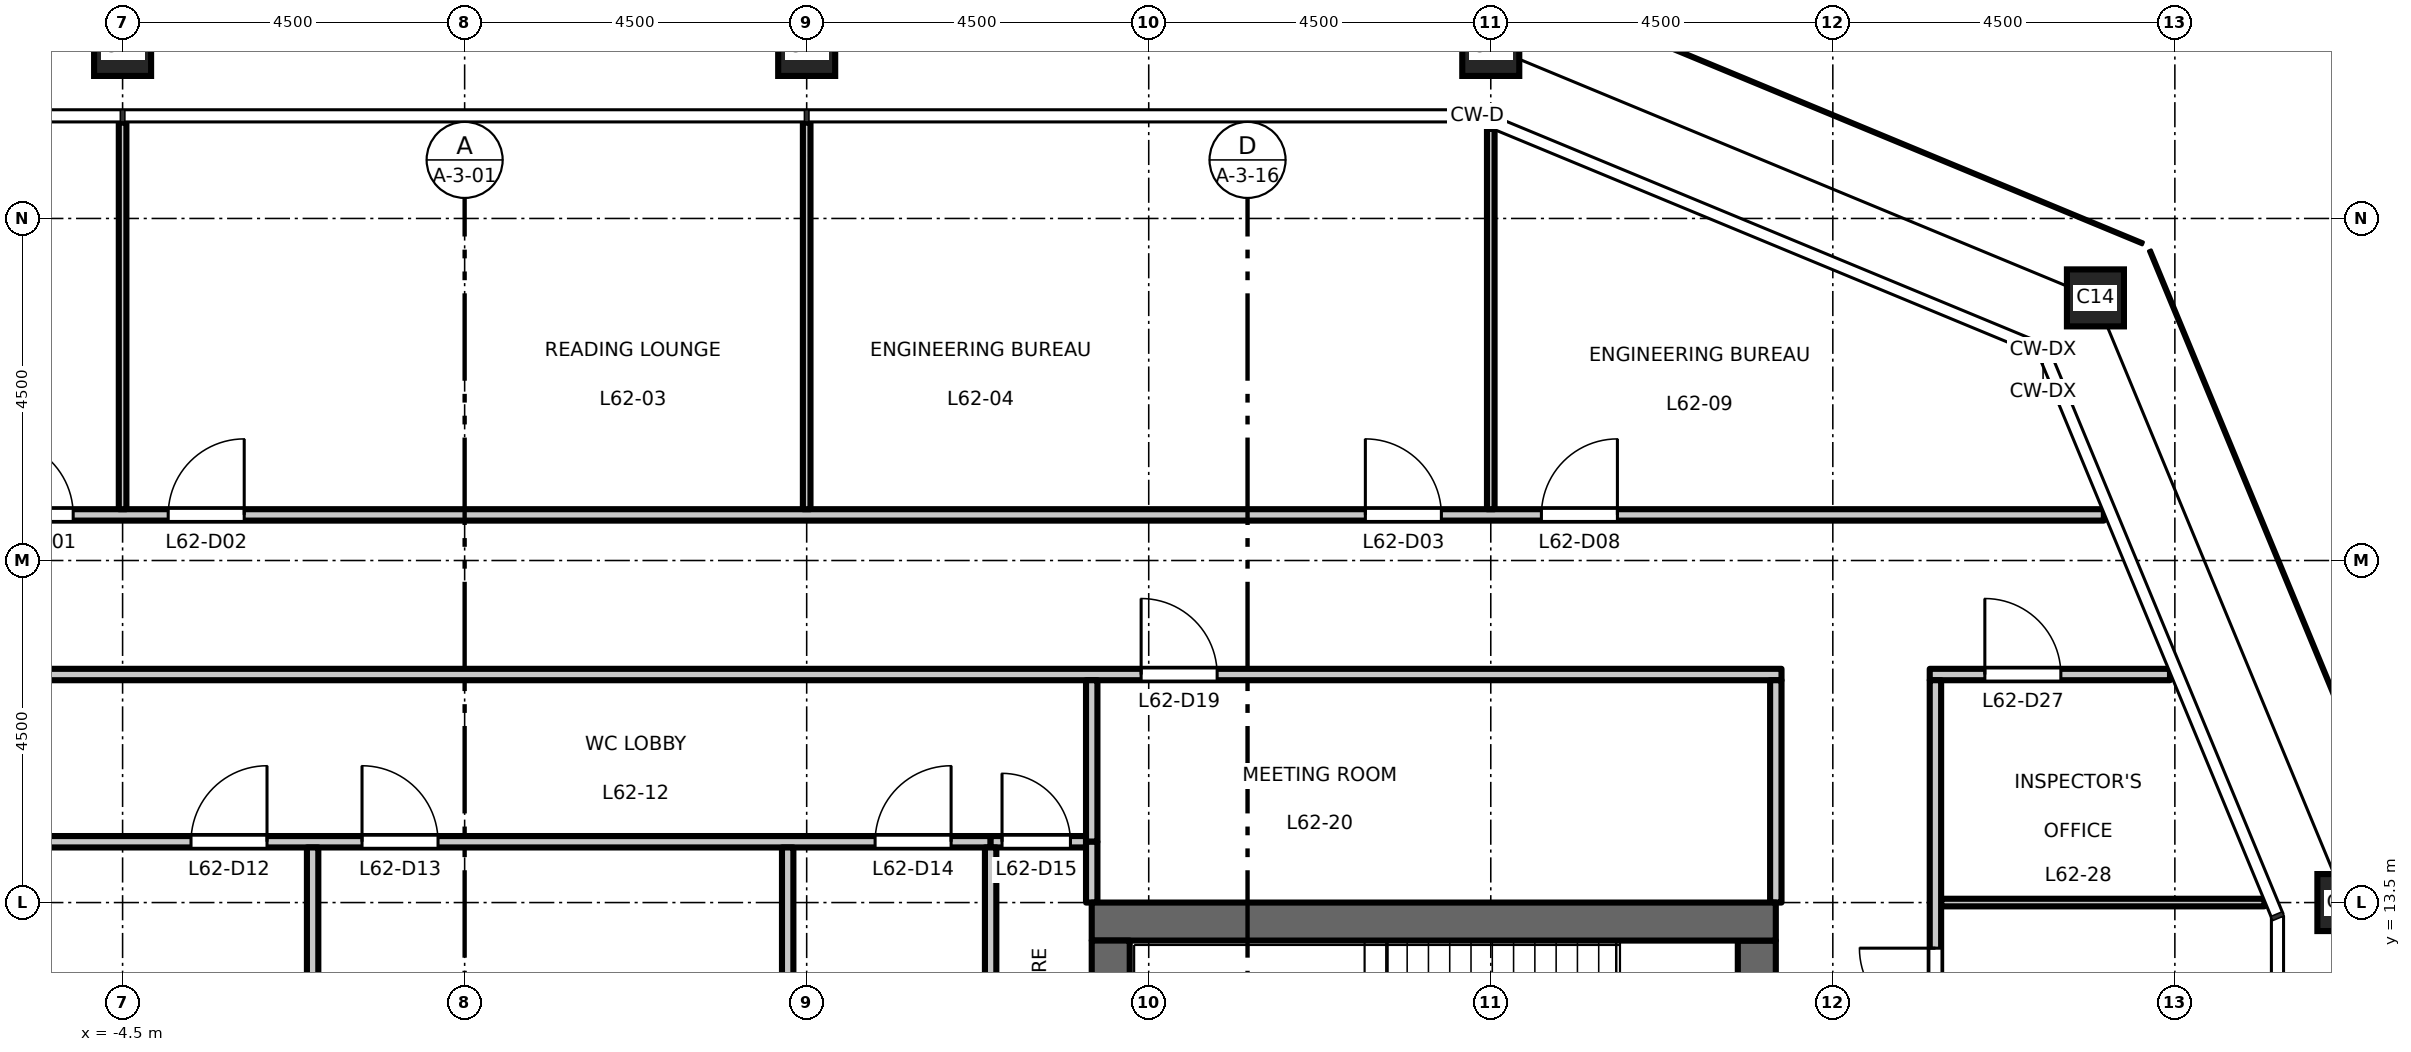
"""IFC4 building model, lengths in metres.
Left out: names, types, materials, properties, quantities, classifications, styles, units other than length and angle.
Written with IfcOpenShell. Run it as: python <this file> out.ifc"""

import sys

from ifc_helpers import new_model, si_unit, direction, frame, frame_2d, origin, origin_2d, place, context, subcontext, project, spatial, rectangle, hollow_rectangle, extrude, element, fill, save


model = new_model("IFC4")
c1 = context("Model", 3, precision=1e-05, world=origin(), true_north=direction((0.0, 1.0)))
c2 = subcontext(c1, "Body", "Model", "MODEL_VIEW")
j1 = project(units=[si_unit("LENGTHUNIT", "METRE"), si_unit("PLANEANGLEUNIT", "RADIAN")], contexts=[c1])
p1 = place(None, origin())
s1 = spatial("IfcSite", under=j1, at=p1, CompositionType="ELEMENT")
p2 = place(p1, origin())
s2 = spatial("IfcBuilding", under=s1, at=p2, CompositionType="ELEMENT")
p3 = place(p2, frame((0.0, 0.0, 289.7)))
s3 = spatial("IfcBuildingStorey", under=s2, at=p3, CompositionType="ELEMENT", Elevation=289.7)
for number, where, z_axis, x_axis in (
    (1, (24.75, 13.5, 0.0), (0.0, 0.0, 1.0), (1.0, 0.0, 0.0)),
    (2, (21.455, 21.455, 0.0), (0.0, 0.0, 1.0), (1.0, 0.0, 0.0)),
    (3, (13.5, 24.75, 0.0), (0.0, 0.0, 1.0), (1.0, 0.0, 0.0)),
    (4, (4.5, 24.75, 0.0), (0.0, 0.0, 1.0), (1.0, 0.0, 0.0)),
    (5, (-4.5, 24.75, 0.0), (0.0, 0.0, 1.0), (1.0, 0.0, 0.0)),
):
    element("IfcColumn", number, at=place(p3, frame(where, z_axis=z_axis, x_axis=x_axis)), inside=s3, PredefinedType="COLUMN", context=c2, shape_type="SweptSolid", body=[
        extrude(hollow_rectangle(XDim=0.75, YDim=0.75, WallThickness=0.04, at=origin_2d()), origin(), (0.0, 0.0, 1.0), 4.5),
    ])
p4 = place(p3, frame((17.0, -13.0, 0.0), z_axis=(0.0, 0.0, 1.0), x_axis=(0.0, 1.0, 0.0)))
e6 = element("IfcWall", 6, at=p4, inside=s3, PredefinedType="SHEAR", context=c2, shape_type="SweptSolid", body=[
    extrude(rectangle(XDim=26.0, YDim=0.5, at=frame_2d((13.0, 0.0))), origin(), (0.0, 0.0, 1.0), 4.35),
])
p5 = place(p4, frame((16.825, 0.0, 0.0)))
e7 = element("IfcOpeningElement", 7, at=p5, cuts=e6, PredefinedType="OPENING", context=c2, shape_type="SweptSolid", body=[
    extrude(rectangle(XDim=1.8, YDim=2.1, at=frame_2d((0.9, 1.05))), frame((0.0, 0.26, 0.0), z_axis=(0.0, -1.0, 0.0), x_axis=(1.0, 0.0, 0.0)), (0.0, 0.0, 1.0), 0.52),
])
p6 = place(p4, frame((7.375, 0.0, 0.0)))
e8 = element("IfcOpeningElement", 8, at=p6, cuts=e6, PredefinedType="OPENING", context=c2, shape_type="SweptSolid", body=[
    extrude(rectangle(XDim=1.8, YDim=2.1, at=frame_2d((0.9, 1.05))), frame((0.0, 0.26, 0.0), z_axis=(0.0, -1.0, 0.0), x_axis=(1.0, 0.0, 0.0)), (0.0, 0.0, 1.0), 0.52),
])
p7 = place(p3, frame((8.25, 13.25, 0.0), z_axis=(0.0, 0.0, 1.0), x_axis=(1.0, 0.0, 0.0)))
e9 = element("IfcWall", 9, at=p7, inside=s3, PredefinedType="SHEAR", context=c2, shape_type="SweptSolid", body=[
    extrude(rectangle(XDim=9.0, YDim=0.5, at=frame_2d((4.5, 0.0))), origin(), (0.0, 0.0, 1.0), 4.35),
])
p8 = place(p3, frame((8.5, -13.0, 0.0), z_axis=(0.0, 0.0, 1.0), x_axis=(0.0, 1.0, 0.0)))
e10 = element("IfcWall", 10, at=p8, inside=s3, PredefinedType="SHEAR", context=c2, shape_type="SweptSolid", body=[
    extrude(rectangle(XDim=26.0, YDim=0.5, at=frame_2d((13.0, 0.0))), origin(), (0.0, 0.0, 1.0), 4.35),
])
p9 = place(p3, frame((19.425, 13.5, 0.0), z_axis=(0.0, 0.0, 1.0), x_axis=(1.0, 0.0, 0.0)))
e11 = element("IfcWall", 11, at=p9, inside=s3, PredefinedType="PARTITIONING", context=c2, shape_type="SweptSolid", body=[
    extrude(rectangle(XDim=4.253, YDim=0.1, at=frame_2d((2.126, 0.0))), origin(), (0.0, 0.0, 1.0), 4.35),
])
p10 = place(p3, frame((-8.175, 14.3, 0.0), z_axis=(0.0, 0.0, 1.0), x_axis=(1.0, 0.0, 0.0)))
e12 = element("IfcWall", 12, at=p10, inside=s3, PredefinedType="PARTITIONING", context=c2, shape_type="SweptSolid", body=[
    extrude(rectangle(XDim=15.095, YDim=0.15, at=frame_2d((7.547, 0.0))), origin(), (0.0, 0.0, 1.0), 4.35),
])
p11 = place(p10, frame((4.575, 0.0, 0.0)))
e13 = element("IfcOpeningElement", 13, at=p11, cuts=e12, PredefinedType="OPENING", context=c2, shape_type="SweptSolid", body=[
    extrude(rectangle(XDim=1.0, YDim=2.1, at=frame_2d((0.5, 1.05))), frame((0.0, 0.085, 0.0), z_axis=(0.0, -1.0, 0.0), x_axis=(1.0, 0.0, 0.0)), (0.0, 0.0, 1.0), 0.17),
])
p12 = place(p10, frame((6.825, 0.0, 0.0)))
e14 = element("IfcOpeningElement", 14, at=p12, cuts=e12, PredefinedType="OPENING", context=c2, shape_type="SweptSolid", body=[
    extrude(rectangle(XDim=1.0, YDim=2.1, at=frame_2d((0.5, 1.05))), frame((0.0, 0.085, 0.0), z_axis=(0.0, -1.0, 0.0), x_axis=(1.0, 0.0, 0.0)), (0.0, 0.0, 1.0), 0.17),
])
p13 = place(p10, frame((13.575, 0.0, 0.0)))
e15 = element("IfcOpeningElement", 15, at=p13, cuts=e12, PredefinedType="OPENING", context=c2, shape_type="SweptSolid", body=[
    extrude(rectangle(XDim=1.0, YDim=2.1, at=frame_2d((0.5, 1.05))), frame((0.0, 0.085, 0.0), z_axis=(0.0, -1.0, 0.0), x_axis=(1.0, 0.0, 0.0)), (0.0, 0.0, 1.0), 0.17),
])
p14 = place(p3, frame((6.92, 14.3, 0.0), z_axis=(0.0, 0.0, 1.0), x_axis=(1.0, 0.0, 0.0)))
e16 = element("IfcWall", 16, at=p14, inside=s3, PredefinedType="PARTITIONING", context=c2, shape_type="SweptSolid", body=[
    extrude(rectangle(XDim=1.255, YDim=0.15, at=frame_2d((0.627, 0.0))), origin(), (0.0, 0.0, 1.0), 4.35),
])
p15 = place(p14, frame((0.15, 0.0, 0.0)))
e17 = element("IfcOpeningElement", 17, at=p15, cuts=e16, PredefinedType="OPENING", context=c2, shape_type="SweptSolid", body=[
    extrude(rectangle(XDim=0.9, YDim=2.1, at=frame_2d((0.45, 1.05))), frame((0.0, 0.085, 0.0), z_axis=(0.0, -1.0, 0.0), x_axis=(1.0, 0.0, 0.0)), (0.0, 0.0, 1.0), 0.17),
])
p16 = place(p3, frame((-17.325, 16.5, 0.0), z_axis=(0.0, 0.0, 1.0), x_axis=(1.0, 0.0, 0.0)))
e18 = element("IfcWall", 18, at=p16, inside=s3, PredefinedType="PARTITIONING", context=c2, shape_type="SweptSolid", body=[
    extrude(rectangle(XDim=34.65, YDim=0.15, at=frame_2d((17.325, 0.0))), origin(), (0.0, 0.0, 1.0), 4.35),
])
p17 = place(p16, frame((9.725, 0.0, 0.0)))
e19 = element("IfcOpeningElement", 19, at=p17, cuts=e18, PredefinedType="OPENING", context=c2, shape_type="SweptSolid", body=[
    extrude(rectangle(XDim=1.0, YDim=2.1, at=frame_2d((0.5, 1.05))), frame((0.0, 0.085, 0.0), z_axis=(0.0, -1.0, 0.0), x_axis=(1.0, 0.0, 0.0)), (0.0, 0.0, 1.0), 0.17),
])
p18 = place(p16, frame((7.475, 0.0, 0.0)))
e20 = element("IfcOpeningElement", 20, at=p18, cuts=e18, PredefinedType="OPENING", context=c2, shape_type="SweptSolid", body=[
    extrude(rectangle(XDim=1.0, YDim=2.1, at=frame_2d((0.5, 1.05))), frame((0.0, 0.085, 0.0), z_axis=(0.0, -1.0, 0.0), x_axis=(1.0, 0.0, 0.0)), (0.0, 0.0, 1.0), 0.17),
])
p19 = place(p16, frame((26.225, 0.0, 0.0)))
e21 = element("IfcOpeningElement", 21, at=p19, cuts=e18, PredefinedType="OPENING", context=c2, shape_type="SweptSolid", body=[
    extrude(rectangle(XDim=1.0, YDim=2.1, at=frame_2d((0.5, 1.05))), frame((0.0, 0.085, 0.0), z_axis=(0.0, -1.0, 0.0), x_axis=(1.0, 0.0, 0.0)), (0.0, 0.0, 1.0), 0.17),
])
p20 = place(p3, frame((19.275, 16.5, 0.0), z_axis=(0.0, 0.0, 1.0), x_axis=(1.0, 0.0, 0.0)))
e22 = element("IfcWall", 22, at=p20, inside=s3, PredefinedType="PARTITIONING", context=c2, shape_type="SweptSolid", body=[
    extrude(rectangle(XDim=3.161, YDim=0.15, at=frame_2d((1.581, 0.0))), origin(), (0.0, 0.0, 1.0), 4.35),
])
p21 = place(p20, frame((0.725, 0.0, 0.0)))
e23 = element("IfcOpeningElement", 23, at=p21, cuts=e22, PredefinedType="OPENING", context=c2, shape_type="SweptSolid", body=[
    extrude(rectangle(XDim=1.0, YDim=2.1, at=frame_2d((0.5, 1.05))), frame((0.0, 0.085, 0.0), z_axis=(0.0, -1.0, 0.0), x_axis=(1.0, 0.0, 0.0)), (0.0, 0.0, 1.0), 0.17),
])
p22 = place(p3, frame((-21.566, 18.6, 0.0), z_axis=(0.0, 0.0, 1.0), x_axis=(1.0, 0.0, 0.0)))
e24 = element("IfcWall", 24, at=p22, inside=s3, PredefinedType="PARTITIONING", context=c2, shape_type="SweptSolid", body=[
    extrude(rectangle(XDim=43.132, YDim=0.15, at=frame_2d((21.566, 0.0))), origin(), (0.0, 0.0, 1.0), 4.35),
])
p23 = place(p22, frame((15.416, 0.0, 0.0)))
e25 = element("IfcOpeningElement", 25, at=p23, cuts=e24, PredefinedType="OPENING", context=c2, shape_type="SweptSolid", body=[
    extrude(rectangle(XDim=1.0, YDim=2.1, at=frame_2d((0.5, 1.05))), frame((0.0, 0.085, 0.0), z_axis=(0.0, -1.0, 0.0), x_axis=(1.0, 0.0, 0.0)), (0.0, 0.0, 1.0), 0.17),
])
p24 = place(p22, frame((17.666, 0.0, 0.0)))
e26 = element("IfcOpeningElement", 26, at=p24, cuts=e24, PredefinedType="OPENING", context=c2, shape_type="SweptSolid", body=[
    extrude(rectangle(XDim=1.0, YDim=2.1, at=frame_2d((0.5, 1.05))), frame((0.0, 0.085, 0.0), z_axis=(0.0, -1.0, 0.0), x_axis=(1.0, 0.0, 0.0)), (0.0, 0.0, 1.0), 0.17),
])
p25 = place(p22, frame((33.416, 0.0, 0.0)))
e27 = element("IfcOpeningElement", 27, at=p25, cuts=e24, PredefinedType="OPENING", context=c2, shape_type="SweptSolid", body=[
    extrude(rectangle(XDim=1.0, YDim=2.1, at=frame_2d((0.5, 1.05))), frame((0.0, 0.085, 0.0), z_axis=(0.0, -1.0, 0.0), x_axis=(1.0, 0.0, 0.0)), (0.0, 0.0, 1.0), 0.17),
])
p26 = place(p22, frame((6.416, 0.0, 0.0)))
e28 = element("IfcOpeningElement", 28, at=p26, cuts=e24, PredefinedType="OPENING", context=c2, shape_type="SweptSolid", body=[
    extrude(rectangle(XDim=1.0, YDim=2.1, at=frame_2d((0.5, 1.05))), frame((0.0, 0.085, 0.0), z_axis=(0.0, -1.0, 0.0), x_axis=(1.0, 0.0, 0.0)), (0.0, 0.0, 1.0), 0.17),
])
p27 = place(p22, frame((35.732, 0.0, 0.0)))
e29 = element("IfcOpeningElement", 29, at=p27, cuts=e24, PredefinedType="OPENING", context=c2, shape_type="SweptSolid", body=[
    extrude(rectangle(XDim=1.0, YDim=2.1, at=frame_2d((0.5, 1.05))), frame((0.0, 0.085, 0.0), z_axis=(0.0, -1.0, 0.0), x_axis=(1.0, 0.0, 0.0)), (0.0, 0.0, 1.0), 0.17),
])
p28 = place(p3, frame((-4.5, 18.675, 0.0), z_axis=(0.0, 0.0, 1.0), x_axis=(0.0, 1.0, 0.0)))
e30 = element("IfcWall", 30, at=p28, inside=s3, PredefinedType="PARTITIONING", context=c2, shape_type="SweptSolid", body=[
    extrude(rectangle(XDim=5.085, YDim=0.1, at=frame_2d((2.542, 0.0))), origin(), (0.0, 0.0, 1.0), 3.65),
])
for number, where, z_axis, x_axis in (
    (31, (-2.0, 8.37, 0.0), (0.0, 0.0, 1.0), (0.0, 1.0, 0.0)),
    (32, (4.25, 8.37, 0.0), (0.0, 0.0, 1.0), (0.0, 1.0, 0.0)),
):
    element("IfcWall", number, at=place(p3, frame(where, z_axis=z_axis, x_axis=x_axis)), inside=s3, PredefinedType="PARTITIONING", context=c2, shape_type="SweptSolid", body=[
        extrude(rectangle(XDim=5.855, YDim=0.15, at=frame_2d((2.927, 0.0))), origin(), (0.0, 0.0, 1.0), 4.35),
    ])
p29 = place(p3, frame((4.5, 18.675, 0.0), z_axis=(0.0, 0.0, 1.0), x_axis=(0.0, 1.0, 0.0)))
e33 = element("IfcWall", 33, at=p29, inside=s3, PredefinedType="PARTITIONING", context=c2, shape_type="SweptSolid", body=[
    extrude(rectangle(XDim=5.085, YDim=0.1, at=frame_2d((2.542, 0.0))), origin(), (0.0, 0.0, 1.0), 3.65),
])
p30 = place(p3, frame((6.92, 8.029, 0.0), z_axis=(0.0, 0.0, 1.0), x_axis=(0.0, 1.0, 0.0)))
e34 = element("IfcWall", 34, at=p30, inside=s3, PredefinedType="PARTITIONING", context=c2, shape_type="SweptSolid", body=[
    extrude(rectangle(XDim=6.196, YDim=0.15, at=frame_2d((3.098, 0.0))), origin(), (0.0, 0.0, 1.0), 4.35),
])
p31 = place(p3, frame((8.25, 14.3, 0.0), z_axis=(0.0, 0.0, 1.0), x_axis=(0.0, 1.0, 0.0)))
e35 = element("IfcWall", 35, at=p31, inside=s3, PredefinedType="PARTITIONING", context=c2, shape_type="SweptSolid", body=[
    extrude(rectangle(XDim=2.125, YDim=0.15, at=frame_2d((1.062, 0.0))), origin(), (0.0, 0.0, 1.0), 4.35),
])
p32 = place(p3, frame((8.25, 13.5, 0.0), z_axis=(0.0, 0.0, 1.0), x_axis=(0.0, 1.0, 0.0)))
e36 = element("IfcWall", 36, at=p32, inside=s3, PredefinedType="PARTITIONING", context=c2, shape_type="SweptSolid", body=[
    extrude(rectangle(XDim=0.8, YDim=0.15, at=frame_2d((0.4, 0.0))), origin(), (0.0, 0.0, 1.0), 4.35),
])
p33 = place(p3, frame((13.5, 18.675, 0.0), z_axis=(0.0, 0.0, 1.0), x_axis=(0.0, 1.0, 0.0)))
e37 = element("IfcWall", 37, at=p33, inside=s3, PredefinedType="PARTITIONING", context=c2, shape_type="SweptSolid", body=[
    extrude(rectangle(XDim=5.003, YDim=0.1, at=frame_2d((2.501, 0.0))), origin(), (0.0, 0.0, 1.0), 3.75),
])
p34 = place(p3, frame((17.25, 13.5, 0.0), z_axis=(0.0, 0.0, 1.0), x_axis=(0.0, 1.0, 0.0)))
e38 = element("IfcWall", 38, at=p34, inside=s3, PredefinedType="PARTITIONING", context=c2, shape_type="SweptSolid", body=[
    extrude(rectangle(XDim=2.925, YDim=0.15, at=frame_2d((1.462, 0.0))), origin(), (0.0, 0.0, 1.0), 4.35),
])
p35 = place(p3, frame((19.35, -16.425, 0.0), z_axis=(0.0, 0.0, 1.0), x_axis=(0.0, 1.0, 0.0)))
e39 = element("IfcWall", 39, at=p35, inside=s3, PredefinedType="PARTITIONING", context=c2, shape_type="SweptSolid", body=[
    extrude(rectangle(XDim=32.85, YDim=0.15, at=frame_2d((16.425, 0.0))), origin(), (0.0, 0.0, 1.0), 4.35),
])
p36 = place(p35, frame((10.325, 0.0, 0.0)))
e40 = element("IfcOpeningElement", 40, at=p36, cuts=e39, PredefinedType="OPENING", context=c2, shape_type="SweptSolid", body=[
    extrude(rectangle(XDim=1.0, YDim=2.1, at=frame_2d((0.5, 1.05))), frame((0.0, 0.085, 0.0), z_axis=(0.0, -1.0, 0.0), x_axis=(1.0, 0.0, 0.0)), (0.0, 0.0, 1.0), 0.17),
])
p37 = place(p35, frame((12.575, 0.0, 0.0)))
e41 = element("IfcOpeningElement", 41, at=p37, cuts=e39, PredefinedType="OPENING", context=c2, shape_type="SweptSolid", body=[
    extrude(rectangle(XDim=1.0, YDim=2.1, at=frame_2d((0.5, 1.05))), frame((0.0, 0.085, 0.0), z_axis=(0.0, -1.0, 0.0), x_axis=(1.0, 0.0, 0.0)), (0.0, 0.0, 1.0), 0.17),
])
p38 = place(p35, frame((28.325, 0.0, 0.0)))
e42 = element("IfcOpeningElement", 42, at=p38, cuts=e39, PredefinedType="OPENING", context=c2, shape_type="SweptSolid", body=[
    extrude(rectangle(XDim=1.0, YDim=2.1, at=frame_2d((0.5, 1.05))), frame((0.0, 0.085, 0.0), z_axis=(0.0, -1.0, 0.0), x_axis=(1.0, 0.0, 0.0)), (0.0, 0.0, 1.0), 0.17),
])
p39 = place(p23, origin())
e43 = element("IfcDoor", 43, at=p39, inside=s3, OperationType="SINGLE_SWING_LEFT", PredefinedType="DOOR", context=c2, shape_type="SweptSolid", body=[
    extrude(rectangle(XDim=1.0, YDim=2.1, at=frame_2d((0.5, 1.05))), frame((0.0, 0.025, 0.0), z_axis=(0.0, -1.0, 0.0), x_axis=(1.0, 0.0, 0.0)), (0.0, 0.0, 1.0), 0.05),
])
fill(e25, e43)
p40 = place(p24, origin())
e44 = element("IfcDoor", 44, at=p40, inside=s3, OperationType="SINGLE_SWING_RIGHT", PredefinedType="DOOR", context=c2, shape_type="SweptSolid", body=[
    extrude(rectangle(XDim=1.0, YDim=2.1, at=frame_2d((0.5, 1.05))), frame((0.0, 0.025, 0.0), z_axis=(0.0, -1.0, 0.0), x_axis=(1.0, 0.0, 0.0)), (0.0, 0.0, 1.0), 0.05),
])
fill(e26, e44)
p41 = place(p25, origin())
e45 = element("IfcDoor", 45, at=p41, inside=s3, OperationType="SINGLE_SWING_LEFT", PredefinedType="DOOR", context=c2, shape_type="SweptSolid", body=[
    extrude(rectangle(XDim=1.0, YDim=2.1, at=frame_2d((0.5, 1.05))), frame((0.0, 0.025, 0.0), z_axis=(0.0, -1.0, 0.0), x_axis=(1.0, 0.0, 0.0)), (0.0, 0.0, 1.0), 0.05),
])
fill(e27, e45)
p42 = place(p27, origin())
e46 = element("IfcDoor", 46, at=p42, inside=s3, OperationType="SINGLE_SWING_RIGHT", PredefinedType="DOOR", context=c2, shape_type="SweptSolid", body=[
    extrude(rectangle(XDim=1.0, YDim=2.1, at=frame_2d((0.5, 1.05))), frame((0.0, 0.025, 0.0), z_axis=(0.0, -1.0, 0.0), x_axis=(1.0, 0.0, 0.0)), (0.0, 0.0, 1.0), 0.05),
])
fill(e29, e46)
p43 = place(p11, origin())
e47 = element("IfcDoor", 47, at=p43, inside=s3, OperationType="SINGLE_SWING_RIGHT", PredefinedType="DOOR", context=c2, shape_type="SweptSolid", body=[
    extrude(rectangle(XDim=1.0, YDim=2.1, at=frame_2d((0.5, 1.05))), frame((0.0, 0.025, 0.0), z_axis=(0.0, -1.0, 0.0), x_axis=(1.0, 0.0, 0.0)), (0.0, 0.0, 1.0), 0.05),
])
fill(e13, e47)
p44 = place(p12, origin())
e48 = element("IfcDoor", 48, at=p44, inside=s3, OperationType="SINGLE_SWING_LEFT", PredefinedType="DOOR", context=c2, shape_type="SweptSolid", body=[
    extrude(rectangle(XDim=1.0, YDim=2.1, at=frame_2d((0.5, 1.05))), frame((0.0, 0.025, 0.0), z_axis=(0.0, -1.0, 0.0), x_axis=(1.0, 0.0, 0.0)), (0.0, 0.0, 1.0), 0.05),
])
fill(e14, e48)
p45 = place(p13, origin())
e49 = element("IfcDoor", 49, at=p45, inside=s3, OperationType="SINGLE_SWING_RIGHT", PredefinedType="DOOR", context=c2, shape_type="SweptSolid", body=[
    extrude(rectangle(XDim=1.0, YDim=2.1, at=frame_2d((0.5, 1.05))), frame((0.0, 0.025, 0.0), z_axis=(0.0, -1.0, 0.0), x_axis=(1.0, 0.0, 0.0)), (0.0, 0.0, 1.0), 0.05),
])
fill(e15, e49)
p46 = place(p15, origin())
e50 = element("IfcDoor", 50, at=p46, inside=s3, OperationType="SINGLE_SWING_LEFT", PredefinedType="DOOR", context=c2, shape_type="SweptSolid", body=[
    extrude(rectangle(XDim=0.9, YDim=2.1, at=frame_2d((0.45, 1.05))), frame((0.0, 0.025, 0.0), z_axis=(0.0, -1.0, 0.0), x_axis=(1.0, 0.0, 0.0)), (0.0, 0.0, 1.0), 0.05),
])
fill(e17, e50)
p47 = place(p19, origin())
e51 = element("IfcDoor", 51, at=p47, inside=s3, OperationType="SINGLE_SWING_LEFT", PredefinedType="DOOR", context=c2, shape_type="SweptSolid", body=[
    extrude(rectangle(XDim=1.0, YDim=2.1, at=frame_2d((0.5, 1.05))), frame((0.0, 0.025, 0.0), z_axis=(0.0, -1.0, 0.0), x_axis=(1.0, 0.0, 0.0)), (0.0, 0.0, 1.0), 0.05),
])
fill(e21, e51)
p48 = place(p38, origin())
e52 = element("IfcDoor", 52, at=p48, inside=s3, OperationType="SINGLE_SWING_RIGHT", PredefinedType="DOOR", context=c2, shape_type="SweptSolid", body=[
    extrude(rectangle(XDim=1.0, YDim=2.1, at=frame_2d((0.5, 1.05))), frame((0.0, 0.025, 0.0), z_axis=(0.0, -1.0, 0.0), x_axis=(1.0, 0.0, 0.0)), (0.0, 0.0, 1.0), 0.05),
])
fill(e42, e52)
p49 = place(p21, origin())
e53 = element("IfcDoor", 53, at=p49, inside=s3, OperationType="SINGLE_SWING_LEFT", PredefinedType="DOOR", context=c2, shape_type="SweptSolid", body=[
    extrude(rectangle(XDim=1.0, YDim=2.1, at=frame_2d((0.5, 1.05))), frame((0.0, 0.025, 0.0), z_axis=(0.0, -1.0, 0.0), x_axis=(1.0, 0.0, 0.0)), (0.0, 0.0, 1.0), 0.05),
])
fill(e23, e53)
save(model, sys.argv[1])
